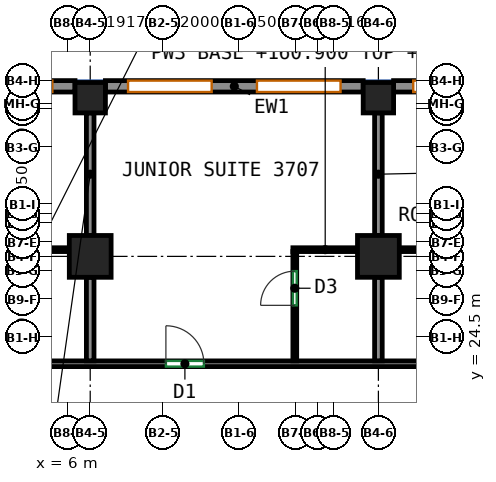
"""IFC4 building model, lengths in metres.
Left out: names, types, materials, properties, quantities, classifications, styles, units other than length and angle.
Written with IfcOpenShell. Run it as: python <this file> out.ifc"""

import sys

from ifc_helpers import new_model, si_unit, direction, frame, frame_2d, origin, origin_2d, place, context, subcontext, project, spatial, rectangle, extrude, source, transform, mapped, element, fill, save


model = new_model("IFC4")
c1 = context("Model", 3, precision=1e-05, world=origin(), true_north=direction((0.0, 1.0)))
c2 = subcontext(c1, "Body", "Model", "MODEL_VIEW")
j1 = project(units=[si_unit("LENGTHUNIT", "METRE"), si_unit("PLANEANGLEUNIT", "RADIAN")], contexts=[c1])
p1 = place(None, origin())
s1 = spatial("IfcSite", under=j1, at=p1, CompositionType="ELEMENT")
p2 = place(p1, origin())
s2 = spatial("IfcBuilding", under=s1, at=p2, CompositionType="ELEMENT")
p3 = place(p2, frame((0.0, 0.0, 160.9)))
s3 = spatial("IfcBuildingStorey", under=s2, at=p3, CompositionType="ELEMENT", Elevation=160.9)
m1 = source(origin(), c2, "Body", "SweptSolid", [
    extrude(rectangle(XDim=1.1, YDim=1.1, at=origin_2d()), origin(), (0.0, 0.0, 1.0), 3.0),
])
p4 = place(p3, frame((6.583, 26.625, 0.0), z_axis=(0.0, 0.0, 1.0), x_axis=(1.0, 0.0, 0.0)))
e1 = element("IfcColumn", 1, at=p4, inside=s3, PredefinedType="COLUMN", context=c2, shape_type="MappedRepresentation", body=[
    mapped(m1, transform((0.0, 0.0, 0.0))),
])
m2 = source(origin(), c2, "Body", "SweptSolid", [
    extrude(rectangle(XDim=0.8, YDim=0.8, at=origin_2d()), origin(), (0.0, 0.0, 1.0), 3.0),
])
p5 = place(p3, frame((6.583, 30.8, 0.0), z_axis=(0.0, 0.0, 1.0), x_axis=(1.0, 0.0, 0.0)))
e2 = element("IfcColumn", 2, at=p5, inside=s3, PredefinedType="COLUMN", context=c2, shape_type="MappedRepresentation", body=[
    mapped(m2, transform((0.0, 0.0, 0.0))),
])
p6 = place(p3, frame((14.167, 26.625, 0.0), z_axis=(0.0, 0.0, 1.0), x_axis=(1.0, 0.0, 0.0)))
e3 = element("IfcColumn", 3, at=p6, inside=s3, PredefinedType="COLUMN", context=c2, shape_type="MappedRepresentation", body=[
    mapped(m1, transform((0.0, 0.0, 0.0))),
])
p7 = place(p3, frame((14.167, 30.8, 0.0), z_axis=(0.0, 0.0, 1.0), x_axis=(1.0, 0.0, 0.0)))
e4 = element("IfcColumn", 4, at=p7, inside=s3, PredefinedType="COLUMN", context=c2, shape_type="MappedRepresentation", body=[
    mapped(m2, transform((0.0, 0.0, 0.0))),
])
m3 = source(origin(), c2, "Body", "SweptSolid", [
    extrude(rectangle(XDim=6.465, YDim=0.3, at=frame_2d((3.232, 0.0))), origin(), (0.0, 0.0, 1.0), 3.0),
])
p8 = place(p3, frame((21.032, 31.1, 0.0), z_axis=(0.0, 0.0, 1.0), x_axis=(-1.0, 0.0, 0.0)))
e5 = element("IfcWall", 5, at=p8, inside=s3, PredefinedType="SOLIDWALL", context=c2, shape_type="MappedRepresentation", body=[
    mapped(m3, transform((0.0, 0.0, 0.0))),
])
p9 = place(p8, frame((0.516, 0.0, 0.85)))
e6 = element("IfcOpeningElement", 6, at=p9, cuts=e5, PredefinedType="OPENING", context=c2, shape_type="SweptSolid", body=[
    extrude(rectangle(XDim=2.2, YDim=1.95, at=frame_2d((1.1, 0.975))), frame((0.0, 0.16, 0.0), z_axis=(0.0, -1.0, 0.0), x_axis=(1.0, 0.0, 0.0)), (0.0, 0.0, 1.0), 0.32),
])
p10 = place(p8, frame((3.749, 0.0, 0.85)))
e7 = element("IfcOpeningElement", 7, at=p10, cuts=e5, PredefinedType="OPENING", context=c2, shape_type="SweptSolid", body=[
    extrude(rectangle(XDim=2.2, YDim=1.95, at=frame_2d((1.1, 0.975))), frame((0.0, 0.16, 0.0), z_axis=(0.0, -1.0, 0.0), x_axis=(1.0, 0.0, 0.0)), (0.0, 0.0, 1.0), 0.32),
])
m4 = source(origin(), c2, "Body", "SweptSolid", [
    extrude(rectangle(XDim=6.783, YDim=0.3, at=frame_2d((3.392, 0.0))), origin(), (0.0, 0.0, 1.0), 3.0),
])
p11 = place(p3, frame((13.767, 31.1, 0.0), z_axis=(0.0, 0.0, 1.0), x_axis=(-1.0, 0.0, 0.0)))
e8 = element("IfcWall", 8, at=p11, inside=s3, PredefinedType="SOLIDWALL", context=c2, shape_type="MappedRepresentation", body=[
    mapped(m4, transform((0.0, 0.0, 0.0))),
])
p12 = place(p11, frame((0.596, 0.0, 0.85)))
e9 = element("IfcOpeningElement", 9, at=p12, cuts=e8, PredefinedType="OPENING", context=c2, shape_type="SweptSolid", body=[
    extrude(rectangle(XDim=2.2, YDim=1.95, at=frame_2d((1.1, 0.975))), frame((0.0, 0.16, 0.0), z_axis=(0.0, -1.0, 0.0), x_axis=(1.0, 0.0, 0.0)), (0.0, 0.0, 1.0), 0.32),
])
p13 = place(p11, frame((3.988, 0.0, 0.85)))
e10 = element("IfcOpeningElement", 10, at=p13, cuts=e8, PredefinedType="OPENING", context=c2, shape_type="SweptSolid", body=[
    extrude(rectangle(XDim=2.2, YDim=1.95, at=frame_2d((1.1, 0.975))), frame((0.0, 0.16, 0.0), z_axis=(0.0, -1.0, 0.0), x_axis=(1.0, 0.0, 0.0)), (0.0, 0.0, 1.0), 0.32),
])
m5 = source(origin(), c2, "Body", "SweptSolid", [
    extrude(rectangle(XDim=6.783, YDim=0.3, at=frame_2d((3.392, 0.0))), origin(), (0.0, 0.0, 1.0), 3.0),
])
p14 = place(p3, frame((6.183, 31.1, 0.0), z_axis=(0.0, 0.0, 1.0), x_axis=(-1.0, 0.0, 0.0)))
e11 = element("IfcWall", 11, at=p14, inside=s3, PredefinedType="SOLIDWALL", context=c2, shape_type="MappedRepresentation", body=[
    mapped(m5, transform((0.0, 0.0, 0.0))),
])
p15 = place(p14, frame((0.596, 0.0, 0.85)))
e12 = element("IfcOpeningElement", 12, at=p15, cuts=e11, PredefinedType="OPENING", context=c2, shape_type="SweptSolid", body=[
    extrude(rectangle(XDim=2.2, YDim=1.95, at=frame_2d((1.1, 0.975))), frame((0.0, 0.16, 0.0), z_axis=(0.0, -1.0, 0.0), x_axis=(1.0, 0.0, 0.0)), (0.0, 0.0, 1.0), 0.32),
])
p16 = place(p14, frame((3.988, 0.0, 0.85)))
e13 = element("IfcOpeningElement", 13, at=p16, cuts=e11, PredefinedType="OPENING", context=c2, shape_type="SweptSolid", body=[
    extrude(rectangle(XDim=2.2, YDim=1.95, at=frame_2d((1.1, 0.975))), frame((0.0, 0.16, 0.0), z_axis=(0.0, -1.0, 0.0), x_axis=(1.0, 0.0, 0.0)), (0.0, 0.0, 1.0), 0.32),
])
p17 = place(p3, frame((-20.059, 23.8, 0.0), z_axis=(0.0, 0.0, 1.0), x_axis=(1.0, 0.0, 0.0)))
e14 = element("IfcWall", 14, at=p17, inside=s3, PredefinedType="PARTITIONING", context=c2, shape_type="SweptSolid", body=[
    extrude(rectangle(XDim=41.909, YDim=0.15, at=frame_2d((20.955, 0.0))), origin(), (0.0, 0.0, 1.0), 3.0),
])
p18 = place(p17, frame((2.59, 0.0, 0.0)))
e15 = element("IfcOpeningElement", 15, at=p18, cuts=e14, PredefinedType="OPENING", context=c2, shape_type="SweptSolid", body=[
    extrude(rectangle(XDim=1.0, YDim=2.1, at=frame_2d((0.5, 1.05))), frame((0.0, 0.085, 0.0), z_axis=(0.0, -1.0, 0.0), x_axis=(1.0, 0.0, 0.0)), (0.0, 0.0, 1.0), 0.17),
])
p19 = place(p17, frame((8.875, 0.0, 0.0)))
e16 = element("IfcOpeningElement", 16, at=p19, cuts=e14, PredefinedType="OPENING", context=c2, shape_type="SweptSolid", body=[
    extrude(rectangle(XDim=1.0, YDim=2.1, at=frame_2d((0.5, 1.05))), frame((0.0, 0.085, 0.0), z_axis=(0.0, -1.0, 0.0), x_axis=(1.0, 0.0, 0.0)), (0.0, 0.0, 1.0), 0.17),
])
p20 = place(p17, frame((19.203, 0.0, 0.0)))
e17 = element("IfcOpeningElement", 17, at=p20, cuts=e14, PredefinedType="OPENING", context=c2, shape_type="SweptSolid", body=[
    extrude(rectangle(XDim=1.0, YDim=2.1, at=frame_2d((0.5, 1.05))), frame((0.0, 0.085, 0.0), z_axis=(0.0, -1.0, 0.0), x_axis=(1.0, 0.0, 0.0)), (0.0, 0.0, 1.0), 0.17),
])
p21 = place(p17, frame((28.634, 0.0, 0.0)))
e18 = element("IfcOpeningElement", 18, at=p21, cuts=e14, PredefinedType="OPENING", context=c2, shape_type="SweptSolid", body=[
    extrude(rectangle(XDim=1.0, YDim=2.1, at=frame_2d((0.5, 1.05))), frame((0.0, 0.085, 0.0), z_axis=(0.0, -1.0, 0.0), x_axis=(1.0, 0.0, 0.0)), (0.0, 0.0, 1.0), 0.17),
])
p22 = place(p17, frame((36.616, 0.0, 0.0)))
e19 = element("IfcOpeningElement", 19, at=p22, cuts=e14, PredefinedType="OPENING", context=c2, shape_type="SweptSolid", body=[
    extrude(rectangle(XDim=1.0, YDim=2.1, at=frame_2d((0.5, 1.05))), frame((0.0, 0.085, 0.0), z_axis=(0.0, -1.0, 0.0), x_axis=(1.0, 0.0, 0.0)), (0.0, 0.0, 1.0), 0.17),
])
p23 = place(p17, frame((38.208, 0.0, 0.0)))
e20 = element("IfcOpeningElement", 20, at=p23, cuts=e14, PredefinedType="OPENING", context=c2, shape_type="SweptSolid", body=[
    extrude(rectangle(XDim=1.0, YDim=2.1, at=frame_2d((0.5, 1.05))), frame((0.0, 0.085, 0.0), z_axis=(0.0, -1.0, 0.0), x_axis=(1.0, 0.0, 0.0)), (0.0, 0.0, 1.0), 0.17),
])
p24 = place(p3, frame((4.333, 26.802, 0.0), z_axis=(0.0, 0.0, 1.0), x_axis=(1.0, 0.0, 0.0)))
e21 = element("IfcWall", 21, at=p24, inside=s3, PredefinedType="PARTITIONING", context=c2, shape_type="SweptSolid", body=[
    extrude(rectangle(XDim=1.7, YDim=0.1, at=frame_2d((0.85, 0.0))), origin(), (0.0, 0.0, 1.0), 2.4),
])
p25 = place(p3, frame((6.583, 27.175, 0.0), z_axis=(0.0, 0.0, 1.0), x_axis=(0.0, 1.0, 0.0)))
e22 = element("IfcWall", 22, at=p25, inside=s3, PredefinedType="PARTITIONING", context=c2, shape_type="SweptSolid", body=[
    extrude(rectangle(XDim=3.225, YDim=0.2, at=frame_2d((1.612, 0.0))), origin(), (0.0, 0.0, 1.0), 2.4),
])
p26 = place(p3, frame((6.583, 23.877, 0.0), z_axis=(0.0, 0.0, 1.0), x_axis=(0.0, 1.0, 0.0)))
e23 = element("IfcWall", 23, at=p26, inside=s3, PredefinedType="PARTITIONING", context=c2, shape_type="SweptSolid", body=[
    extrude(rectangle(XDim=2.198, YDim=0.2, at=frame_2d((1.099, 0.0))), origin(), (0.0, 0.0, 1.0), 3.0),
])
p27 = place(p3, frame((11.917, 26.802, 0.0), z_axis=(0.0, 0.0, 1.0), x_axis=(1.0, 0.0, 0.0)))
e24 = element("IfcWall", 24, at=p27, inside=s3, PredefinedType="PARTITIONING", context=c2, shape_type="SweptSolid", body=[
    extrude(rectangle(XDim=1.7, YDim=0.1, at=frame_2d((0.85, 0.0))), origin(), (0.0, 0.0, 1.0), 2.4),
])
p28 = place(p3, frame((11.967, 23.877, 0.0), z_axis=(0.0, 0.0, 1.0), x_axis=(0.0, 1.0, 0.0)))
e25 = element("IfcWall", 25, at=p28, inside=s3, PredefinedType="PARTITIONING", context=c2, shape_type="SweptSolid", body=[
    extrude(rectangle(XDim=2.875, YDim=0.1, at=frame_2d((1.438, 0.0))), origin(), (0.0, 0.0, 1.0), 3.0),
])
p29 = place(p28, frame((1.46, 0.0, 0.0)))
e26 = element("IfcOpeningElement", 26, at=p29, cuts=e25, PredefinedType="OPENING", context=c2, shape_type="SweptSolid", body=[
    extrude(rectangle(XDim=0.9, YDim=2.1, at=frame_2d((0.45, 1.05))), frame((0.0, 0.06, 0.0), z_axis=(0.0, -1.0, 0.0), x_axis=(1.0, 0.0, 0.0)), (0.0, 0.0, 1.0), 0.12),
])
p30 = place(p3, frame((14.167, 27.175, 0.0), z_axis=(0.0, 0.0, 1.0), x_axis=(0.0, 1.0, 0.0)))
e27 = element("IfcWall", 27, at=p30, inside=s3, PredefinedType="PARTITIONING", context=c2, shape_type="SweptSolid", body=[
    extrude(rectangle(XDim=3.225, YDim=0.2, at=frame_2d((1.612, 0.0))), origin(), (0.0, 0.0, 1.0), 2.4),
])
p31 = place(p3, frame((14.167, 23.877, 0.0), z_axis=(0.0, 0.0, 1.0), x_axis=(0.0, 1.0, 0.0)))
e28 = element("IfcWall", 28, at=p31, inside=s3, PredefinedType="PARTITIONING", context=c2, shape_type="SweptSolid", body=[
    extrude(rectangle(XDim=2.198, YDim=0.2, at=frame_2d((1.099, 0.0))), origin(), (0.0, 0.0, 1.0), 3.0),
])
p32 = place(p3, frame((14.717, 26.802, 0.0), z_axis=(0.0, 0.0, 1.0), x_axis=(1.0, 0.0, 0.0)))
e29 = element("IfcWall", 29, at=p32, inside=s3, PredefinedType="PARTITIONING", context=c2, shape_type="SweptSolid", body=[
    extrude(rectangle(XDim=1.7, YDim=0.1, at=frame_2d((0.85, 0.0))), origin(), (0.0, 0.0, 1.0), 3.0),
])
p33 = place(p10, origin())
e30 = element("IfcWindow", 30, at=p33, inside=s3, PartitioningType="SINGLE_PANEL", PredefinedType="WINDOW", context=c2, shape_type="SweptSolid", body=[
    extrude(rectangle(XDim=2.2, YDim=1.95, at=frame_2d((1.1, 0.975))), frame((0.0, 0.03, 0.0), z_axis=(0.0, -1.0, 0.0), x_axis=(1.0, 0.0, 0.0)), (0.0, 0.0, 1.0), 0.06),
])
fill(e7, e30)
p34 = place(p12, origin())
e31 = element("IfcWindow", 31, at=p34, inside=s3, PartitioningType="SINGLE_PANEL", PredefinedType="WINDOW", context=c2, shape_type="SweptSolid", body=[
    extrude(rectangle(XDim=2.2, YDim=1.95, at=frame_2d((1.1, 0.975))), frame((0.0, 0.03, 0.0), z_axis=(0.0, -1.0, 0.0), x_axis=(1.0, 0.0, 0.0)), (0.0, 0.0, 1.0), 0.06),
])
fill(e9, e31)
p35 = place(p13, origin())
e32 = element("IfcWindow", 32, at=p35, inside=s3, PartitioningType="SINGLE_PANEL", PredefinedType="WINDOW", context=c2, shape_type="SweptSolid", body=[
    extrude(rectangle(XDim=2.2, YDim=1.95, at=frame_2d((1.1, 0.975))), frame((0.0, 0.03, 0.0), z_axis=(0.0, -1.0, 0.0), x_axis=(1.0, 0.0, 0.0)), (0.0, 0.0, 1.0), 0.06),
])
fill(e10, e32)
p36 = place(p15, origin())
e33 = element("IfcWindow", 33, at=p36, inside=s3, PartitioningType="SINGLE_PANEL", PredefinedType="WINDOW", context=c2, shape_type="SweptSolid", body=[
    extrude(rectangle(XDim=2.2, YDim=1.95, at=frame_2d((1.1, 0.975))), frame((0.0, 0.03, 0.0), z_axis=(0.0, -1.0, 0.0), x_axis=(1.0, 0.0, 0.0)), (0.0, 0.0, 1.0), 0.06),
])
fill(e12, e33)
p37 = place(p21, origin())
e34 = element("IfcDoor", 34, at=p37, inside=s3, OperationType="SINGLE_SWING_LEFT", PredefinedType="DOOR", context=c2, shape_type="SweptSolid", body=[
    extrude(rectangle(XDim=1.0, YDim=2.1, at=frame_2d((0.5, 1.05))), frame((0.0, 0.025, 0.0), z_axis=(0.0, -1.0, 0.0), x_axis=(1.0, 0.0, 0.0)), (0.0, 0.0, 1.0), 0.05),
])
fill(e18, e34)
p38 = place(p29, origin())
e35 = element("IfcDoor", 35, at=p38, inside=s3, OperationType="SINGLE_SWING_LEFT", PredefinedType="DOOR", context=c2, shape_type="SweptSolid", body=[
    extrude(rectangle(XDim=0.9, YDim=2.1, at=frame_2d((0.45, 1.05))), frame((0.0, 0.025, 0.0), z_axis=(0.0, -1.0, 0.0), x_axis=(1.0, 0.0, 0.0)), (0.0, 0.0, 1.0), 0.05),
])
fill(e26, e35)
save(model, sys.argv[1])
